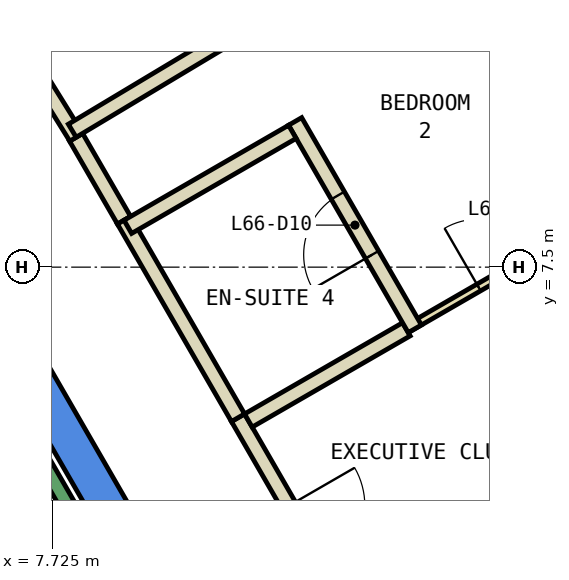
"""IFC4 building model, lengths in metres.
Left out: names, types, materials, properties, quantities, classifications, styles, units other than length and angle.
Written with IfcOpenShell. Run it as: python <this file> out.ifc"""

import sys

from ifc_helpers import new_model, si_unit, direction, frame, frame_2d, origin, place, context, subcontext, project, spatial, polyline, rectangle, outline, extrude, element, fill, save


model = new_model("IFC4")
c1 = context("Model", 3, precision=1e-05, world=origin(), true_north=direction((0.0, 1.0)))
c2 = subcontext(c1, "Body", "Model", "MODEL_VIEW")
j1 = project(units=[si_unit("LENGTHUNIT", "METRE"), si_unit("PLANEANGLEUNIT", "RADIAN")], contexts=[c1])
p1 = place(None, origin())
s1 = spatial("IfcSite", under=j1, at=p1, CompositionType="ELEMENT")
p2 = place(p1, origin())
s2 = spatial("IfcBuilding", under=s1, at=p2, CompositionType="ELEMENT")
p3 = place(p2, frame((0.0, 0.0, 286.4)))
s3 = spatial("IfcBuildingStorey", under=s2, at=p3, CompositionType="ELEMENT", Elevation=286.4)
p4 = place(p3, frame((0.0, 0.0, -0.6)))
e1 = element("IfcWall", 1, at=p4, inside=s3, PredefinedType="SHEAR", context=c2, shape_type="SweptSolid", body=[
    extrude(outline(polyline([(5.486, 9.998), (5.053, 9.748), (9.238, 2.5), (9.815, 2.5), (5.486, 9.998)])), origin(), (0.0, 0.0, 1.0), 3.86),
])
p5 = place(p3, frame((16.821, 5.498, 0.0), z_axis=(0.0, 0.0, 1.0), x_axis=(-0.499945412946, 0.866056917341, 0.0)))
e2 = element("IfcWall", 2, at=p5, inside=s3, PredefinedType="STANDARD", context=c2, shape_type="SweptSolid", body=[
    extrude(rectangle(XDim=7.299, YDim=0.3, at=frame_2d((3.649, 0.0))), origin(), (0.0, 0.0, 1.0), 3.26),
])
p6 = place(p5, frame((0.825, 0.0, 0.0)))
e3 = element("IfcOpeningElement", 3, at=p6, cuts=e2, PredefinedType="OPENING", context=c2, shape_type="SweptSolid", body=[
    extrude(rectangle(XDim=2.0, YDim=2.4, at=frame_2d((1.0, 1.2))), frame((0.0, 0.16, 0.0), z_axis=(0.0, -1.0, 0.0), x_axis=(1.0, 0.0, 0.0)), (0.0, 0.0, 1.0), 0.32),
])
p7 = place(p5, frame((4.374, 0.0, 0.9)))
e4 = element("IfcOpeningElement", 4, at=p7, cuts=e2, PredefinedType="OPENING", context=c2, shape_type="SweptSolid", body=[
    extrude(rectangle(XDim=2.2, YDim=2.0, at=frame_2d((1.1, 1.0))), frame((0.0, 0.16, 0.0), z_axis=(0.0, -1.0, 0.0), x_axis=(1.0, 0.0, 0.0)), (0.0, 0.0, 1.0), 0.32),
])
p8 = place(p3, frame((10.17, 5.519, 0.0), z_axis=(0.0, 0.0, 1.0), x_axis=(0.499990860175, -0.866030680601, 0.0)))
e5 = element("IfcWall", 5, at=p8, inside=s3, PredefinedType="PARTITIONING", context=c2, shape_type="SweptSolid", body=[
    extrude(rectangle(XDim=3.674, YDim=0.2, at=frame_2d((1.837, 0.0))), origin(), (0.0, 0.0, 1.0), 3.26),
])
p9 = place(p8, frame((1.337, 0.0, 0.0)))
e6 = element("IfcOpeningElement", 6, at=p9, cuts=e5, PredefinedType="OPENING", context=c2, shape_type="SweptSolid", body=[
    extrude(rectangle(XDim=1.0, YDim=2.1, at=frame_2d((0.5, 1.05))), frame((0.0, 0.11, 0.0), z_axis=(0.0, -1.0, 0.0), x_axis=(1.0, 0.0, 0.0)), (0.0, 0.0, 1.0), 0.22),
])
p10 = place(p3, frame((8.039, 9.209, 0.0), z_axis=(0.0, 0.0, 1.0), x_axis=(0.500219543227, -0.865898613334, 0.0)))
e7 = element("IfcWall", 7, at=p10, inside=s3, PredefinedType="PARTITIONING", context=c2, shape_type="SweptSolid", body=[
    extrude(rectangle(XDim=1.261, YDim=0.2, at=frame_2d((0.631, 0.0))), origin(), (0.0, 0.0, 1.0), 3.26),
])
p11 = place(p3, frame((8.67, 8.117, 0.0), z_axis=(0.0, 0.0, 1.0), x_axis=(0.50002537861, -0.866010750942, 0.0)))
e8 = element("IfcWall", 8, at=p11, inside=s3, PredefinedType="PARTITIONING", context=c2, shape_type="SweptSolid", body=[
    extrude(rectangle(XDim=3.0, YDim=0.2, at=frame_2d((1.5, 0.0))), origin(), (0.0, 0.0, 1.0), 3.26),
])
p12 = place(p3, frame((6.775, 11.249, 0.0), z_axis=(0.0, 0.0, 1.0), x_axis=(0.527803270752, -0.849366650736, 0.0)))
e9 = element("IfcWall", 9, at=p12, inside=s3, PredefinedType="PARTITIONING", context=c2, shape_type="SweptSolid", body=[
    extrude(rectangle(XDim=2.401, YDim=0.2, at=frame_2d((1.2, 0.0))), origin(), (0.0, 0.0, 1.0), 3.26),
])
p13 = place(p3, frame((12.385, 6.682, 0.0), z_axis=(0.0, 0.0, 1.0), x_axis=(0.865970446821, 0.500095176175, 0.0)))
e10 = element("IfcWall", 10, at=p13, inside=s3, PredefinedType="PARTITIONING", context=c2, shape_type="SweptSolid", body=[
    extrude(rectangle(XDim=3.1, YDim=0.1, at=frame_2d((1.55, 0.0))), origin(), (0.0, 0.0, 1.0), 3.26),
])
p14 = place(p13, frame((1.1, 0.0, 0.0)))
e11 = element("IfcOpeningElement", 11, at=p14, cuts=e10, PredefinedType="OPENING", context=c2, shape_type="SweptSolid", body=[
    extrude(rectangle(XDim=0.9, YDim=2.1, at=frame_2d((0.45, 1.05))), frame((0.0, 0.06, 0.0), z_axis=(0.0, -1.0, 0.0), x_axis=(1.0, 0.0, 0.0)), (0.0, 0.0, 1.0), 0.12),
])
p15 = place(p3, frame((10.306, 5.482, 0.0), z_axis=(0.0, 0.0, 1.0), x_axis=(0.866100915363, 0.499869187296, 0.0)))
e12 = element("IfcWall", 12, at=p15, inside=s3, PredefinedType="PARTITIONING", context=c2, shape_type="SweptSolid", body=[
    extrude(rectangle(XDim=2.401, YDim=0.2, at=frame_2d((1.2, 0.0))), origin(), (0.0, 0.0, 1.0), 3.26),
])
p16 = place(p3, frame((12.496, 6.689, 0.0), z_axis=(0.0, 0.0, 1.0), x_axis=(-0.500039995618, 0.866002311072, 0.0)))
e13 = element("IfcWall", 13, at=p16, inside=s3, PredefinedType="PARTITIONING", context=c2, shape_type="SweptSolid", body=[
    extrude(rectangle(XDim=3.15, YDim=0.2, at=frame_2d((1.575, 0.0))), origin(), (0.0, 0.0, 1.0), 3.26),
])
p17 = place(p16, frame((1.125, 0.0, 0.0)))
e14 = element("IfcOpeningElement", 14, at=p17, cuts=e13, PredefinedType="OPENING", context=c2, shape_type="SweptSolid", body=[
    extrude(rectangle(XDim=0.9, YDim=2.1, at=frame_2d((0.45, 1.05))), frame((0.0, 0.11, 0.0), z_axis=(0.0, -1.0, 0.0), x_axis=(1.0, 0.0, 0.0)), (0.0, 0.0, 1.0), 0.22),
])
p18 = place(p3, frame((10.885, 9.28, 0.0), z_axis=(0.0, 0.0, 1.0), x_axis=(-0.866022959057, -0.500004234368, 0.0)))
e15 = element("IfcWall", 15, at=p18, inside=s3, PredefinedType="PARTITIONING", context=c2, shape_type="SweptSolid", body=[
    extrude(rectangle(XDim=2.5, YDim=0.2, at=frame_2d((1.25, 0.0))), origin(), (0.0, 0.0, 1.0), 3.26),
])
p19 = place(p3, frame((7.989, 9.295, 0.0), z_axis=(0.0, 0.0, 1.0), x_axis=(0.857801856135, 0.513980520654, 0.0)))
e16 = element("IfcWall", 16, at=p19, inside=s3, PredefinedType="PARTITIONING", context=c2, shape_type="SweptSolid", body=[
    extrude(rectangle(XDim=2.3, YDim=0.2, at=frame_2d((1.15, 0.0))), origin(), (0.0, 0.0, 1.0), 3.26),
])
p20 = place(p3, frame((8.48, 3.412, 0.0), z_axis=(0.0, 0.0, 1.0), x_axis=(-0.499978703459, 0.866037698999, 0.0)))
e17 = element("IfcWall", 17, at=p20, inside=s3, PredefinedType="STANDARD", context=c2, shape_type="SweptSolid", body=[
    extrude(rectangle(XDim=6.9, YDim=0.2, at=frame_2d((3.45, 0.0))), origin(), (0.0, 0.0, 1.0), 3.26),
])
p21 = place(p14, origin())
e18 = element("IfcDoor", 18, at=p21, inside=s3, OperationType="SINGLE_SWING_RIGHT", PredefinedType="DOOR", context=c2, shape_type="SweptSolid", body=[
    extrude(rectangle(XDim=0.9, YDim=2.1, at=frame_2d((0.45, 1.05))), frame((0.0, 0.025, 0.0), z_axis=(0.0, -1.0, 0.0), x_axis=(1.0, 0.0, 0.0)), (0.0, 0.0, 1.0), 0.05),
])
fill(e11, e18)
p22 = place(p17, origin())
e19 = element("IfcDoor", 19, at=p22, inside=s3, OperationType="SINGLE_SWING_RIGHT", PredefinedType="DOOR", context=c2, shape_type="SweptSolid", body=[
    extrude(rectangle(XDim=0.9, YDim=2.1, at=frame_2d((0.45, 1.05))), frame((0.0, 0.025, 0.0), z_axis=(0.0, -1.0, 0.0), x_axis=(1.0, 0.0, 0.0)), (0.0, 0.0, 1.0), 0.05),
])
fill(e14, e19)
save(model, sys.argv[1])
